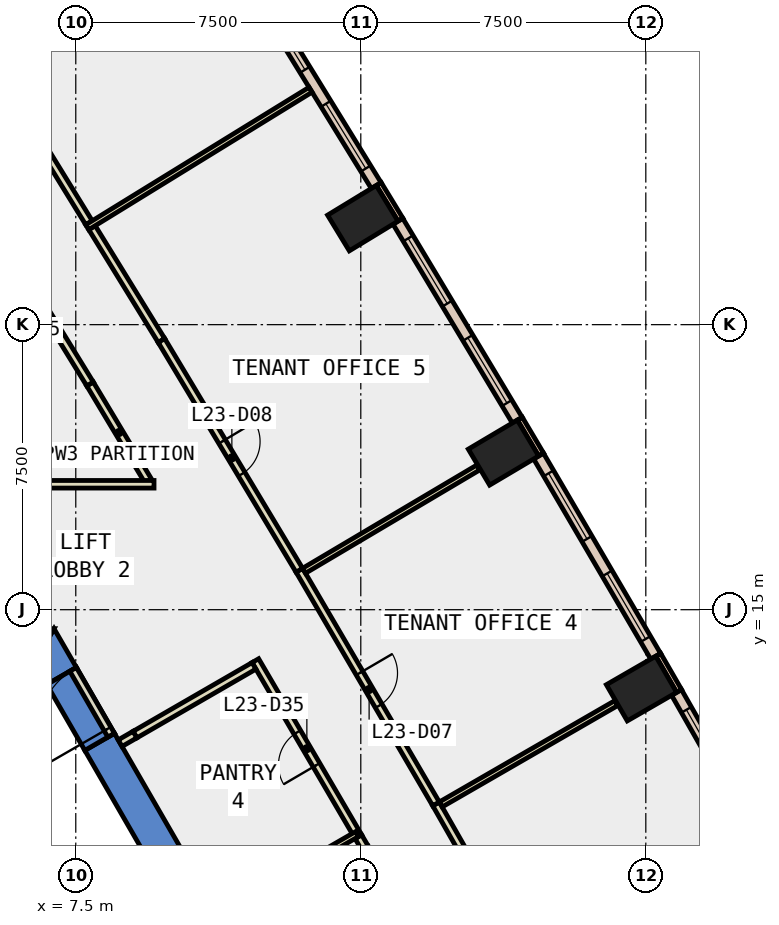
"""IFC4 building model, lengths in metres.
Left out: names, types, materials, properties, quantities, classifications, styles, units other than length and angle.
Written with IfcOpenShell. Run it as: python <this file> out.ifc"""

import sys

from ifc_helpers import new_model, si_unit, direction, frame, frame_2d, origin, origin_2d, place, context, subcontext, project, spatial, polyline, rectangle, outline, extrude, element, fill, save


model = new_model("IFC4")
c1 = context("Model", 3, precision=1e-05, world=origin(), true_north=direction((0.0, 1.0)))
c2 = subcontext(c1, "Body", "Model", "MODEL_VIEW")
j1 = project(units=[si_unit("LENGTHUNIT", "METRE"), si_unit("PLANEANGLEUNIT", "RADIAN")], contexts=[c1])
p1 = place(None, origin())
s1 = spatial("IfcSite", under=j1, at=p1, CompositionType="ELEMENT")
p2 = place(p1, origin())
s2 = spatial("IfcBuilding", under=s1, at=p2, CompositionType="ELEMENT")
p3 = place(p2, frame((0.0, 0.0, 107.6)))
s3 = spatial("IfcBuildingStorey", under=s2, at=p3, CompositionType="ELEMENT", Elevation=107.6)
for number, where, z_axis, x_axis in (
    (1, (22.387, 12.925, -0.4), (0.0, 0.0, 1.0), (-0.5, 0.866, 0.0)),
    (2, (18.755, 19.134, -0.4), (0.0, 0.0, 1.0), (-0.51, 0.86, 0.0)),
    (3, (15.053, 25.302, -0.4), (0.0, 0.0, 1.0), (-0.52, 0.854, 0.0)),
):
    element("IfcColumn", number, at=place(p3, frame(where, z_axis=z_axis, x_axis=x_axis)), inside=s3, PredefinedType="COLUMN", context=c2, shape_type="SweptSolid", body=[
        extrude(rectangle(XDim=1.1, YDim=1.5, at=origin_2d()), origin(), (0.0, 0.0, 1.0), 4.2),
    ])
p4 = place(p3, frame((0.0, 0.0, -0.4)))
e4 = element("IfcWall", 4, at=p4, inside=s3, PredefinedType="SHEAR", context=c2, shape_type="SweptSolid", body=[
    extrude(outline(polyline([(8.517, 11.748), (7.738, 11.298), (12.817, 2.5), (13.856, 2.5), (8.517, 11.748)])), origin(), (0.0, 0.0, 1.0), 4.2),
])
p5 = place(p3, frame((0.0, 0.0, -0.4)))
e5 = element("IfcWall", 5, at=p5, inside=s3, PredefinedType="SHEAR", context=c2, shape_type="SweptSolid", body=[
    extrude(outline(polyline([(6.738, 13.03), (7.517, 13.48), (6.928, 14.5), (6.409, 13.6), (6.738, 13.03)])), origin(), (0.0, 0.0, 1.0), 4.2),
])
p6 = place(p3, frame((0.0, 0.0, 3.6)))
e6 = element("IfcWall", 6, at=p6, inside=s3, PredefinedType="SHEAR", context=c2, shape_type="SweptSolid", body=[
    extrude(outline(polyline([(7.517, 13.48), (6.738, 13.03), (7.738, 11.298), (8.517, 11.748), (7.517, 13.48)])), origin(), (0.0, 0.0, 1.0), 0.2),
])
p7 = place(p3, frame((0.0, 0.0, -0.4)))
e7 = element("IfcWall", 7, at=p7, inside=s3, PredefinedType="SHEAR", context=c2, shape_type="SweptSolid", body=[
    extrude(outline(polyline([(4.55, 14.5), (4.55, 13.6), (6.409, 13.6), (6.928, 14.5), (4.55, 14.5)])), origin(), (0.0, 0.0, 1.0), 4.2),
])
p8 = place(p3, frame((23.376, 12.861, 0.0), z_axis=(0.0, 0.0, 1.0), x_axis=(-0.499933745558, 0.866063652425, 0.0)))
e8 = element("IfcWall", 8, at=p8, inside=s3, PredefinedType="STANDARD", context=c2, shape_type="SweptSolid", body=[
    extrude(rectangle(XDim=1.1, YDim=0.15, at=frame_2d((0.55, 0.0))), origin(), (0.0, 0.0, 1.0), 3.8),
])
p9 = place(p3, frame((19.745, 19.082, 0.0), z_axis=(0.0, 0.0, 1.0), x_axis=(-0.510082245696, 0.860125631885, 0.0)))
e9 = element("IfcWall", 9, at=p9, inside=s3, PredefinedType="STANDARD", context=c2, shape_type="SweptSolid", body=[
    extrude(rectangle(XDim=1.1, YDim=0.15, at=frame_2d((0.55, 0.0))), origin(), (0.0, 0.0, 1.0), 3.8),
])
p10 = place(p3, frame((16.044, 25.261, 0.0), z_axis=(0.0, 0.0, 1.0), x_axis=(-0.519869515594, 0.854245682901, 0.0)))
e10 = element("IfcWall", 10, at=p10, inside=s3, PredefinedType="STANDARD", context=c2, shape_type="SweptSolid", body=[
    extrude(rectangle(XDim=1.1, YDim=0.15, at=frame_2d((0.55, 0.0))), origin(), (0.0, 0.0, 1.0), 3.8),
])
p11 = place(p3, frame((26.33, 7.52, 0.0), z_axis=(0.0, 0.0, 1.0), x_axis=(-0.495113375427, 0.868828375154, 0.0)))
e11 = element("IfcWall", 11, at=p11, inside=s3, PredefinedType="STANDARD", context=c2, shape_type="SweptSolid", body=[
    extrude(rectangle(XDim=6.104, YDim=0.3, at=frame_2d((3.052, 0.0))), origin(), (0.0, 0.0, 1.0), 3.8),
])
p12 = place(p11, frame((0.526, 0.0, 0.9)))
e12 = element("IfcOpeningElement", 12, at=p12, cuts=e11, PredefinedType="OPENING", context=c2, shape_type="SweptSolid", body=[
    extrude(rectangle(XDim=2.0, YDim=2.6, at=frame_2d((1.0, 1.3))), frame((0.0, 0.16, 0.0), z_axis=(0.0, -1.0, 0.0), x_axis=(1.0, 0.0, 0.0)), (0.0, 0.0, 1.0), 0.32),
])
p13 = place(p11, frame((3.578, 0.0, 0.9)))
e13 = element("IfcOpeningElement", 13, at=p13, cuts=e11, PredefinedType="OPENING", context=c2, shape_type="SweptSolid", body=[
    extrude(rectangle(XDim=2.0, YDim=2.6, at=frame_2d((1.0, 1.3))), frame((0.0, 0.16, 0.0), z_axis=(0.0, -1.0, 0.0), x_axis=(1.0, 0.0, 0.0)), (0.0, 0.0, 1.0), 0.32),
])
p14 = place(p3, frame((22.759, 13.774, 0.0), z_axis=(0.0, 0.0, 1.0), x_axis=(-0.50490018297, 0.863177736759, 0.0)))
e14 = element("IfcWall", 14, at=p14, inside=s3, PredefinedType="STANDARD", context=c2, shape_type="SweptSolid", body=[
    extrude(rectangle(XDim=6.104, YDim=0.3, at=frame_2d((3.052, 0.0))), origin(), (0.0, 0.0, 1.0), 3.8),
])
p15 = place(p14, frame((0.526, 0.0, 0.9)))
e15 = element("IfcOpeningElement", 15, at=p15, cuts=e14, PredefinedType="OPENING", context=c2, shape_type="SweptSolid", body=[
    extrude(rectangle(XDim=2.0, YDim=2.6, at=frame_2d((1.0, 1.3))), frame((0.0, 0.16, 0.0), z_axis=(0.0, -1.0, 0.0), x_axis=(1.0, 0.0, 0.0)), (0.0, 0.0, 1.0), 0.32),
])
p16 = place(p14, frame((3.578, 0.0, 0.9)))
e16 = element("IfcOpeningElement", 16, at=p16, cuts=e14, PredefinedType="OPENING", context=c2, shape_type="SweptSolid", body=[
    extrude(rectangle(XDim=2.0, YDim=2.6, at=frame_2d((1.0, 1.3))), frame((0.0, 0.16, 0.0), z_axis=(0.0, -1.0, 0.0), x_axis=(1.0, 0.0, 0.0)), (0.0, 0.0, 1.0), 0.32),
])
p17 = place(p3, frame((19.117, 19.987, 0.0), z_axis=(0.0, 0.0, 1.0), x_axis=(-0.514560454873, 0.857454102726, 0.0)))
e17 = element("IfcWall", 17, at=p17, inside=s3, PredefinedType="STANDARD", context=c2, shape_type="SweptSolid", body=[
    extrude(rectangle(XDim=6.104, YDim=0.3, at=frame_2d((3.052, 0.0))), origin(), (0.0, 0.0, 1.0), 3.8),
])
p18 = place(p17, frame((0.526, 0.0, 0.9)))
e18 = element("IfcOpeningElement", 18, at=p18, cuts=e17, PredefinedType="OPENING", context=c2, shape_type="SweptSolid", body=[
    extrude(rectangle(XDim=2.0, YDim=2.6, at=frame_2d((1.0, 1.3))), frame((0.0, 0.16, 0.0), z_axis=(0.0, -1.0, 0.0), x_axis=(1.0, 0.0, 0.0)), (0.0, 0.0, 1.0), 0.32),
])
p19 = place(p17, frame((3.578, 0.0, 0.9)))
e19 = element("IfcOpeningElement", 19, at=p19, cuts=e17, PredefinedType="OPENING", context=c2, shape_type="SweptSolid", body=[
    extrude(rectangle(XDim=2.0, YDim=2.6, at=frame_2d((1.0, 1.3))), frame((0.0, 0.16, 0.0), z_axis=(0.0, -1.0, 0.0), x_axis=(1.0, 0.0, 0.0)), (0.0, 0.0, 1.0), 0.32),
])
p20 = place(p3, frame((15.406, 26.16, 0.0), z_axis=(0.0, 0.0, 1.0), x_axis=(-0.524121974895, 0.851643208998, 0.0)))
e20 = element("IfcWall", 20, at=p20, inside=s3, PredefinedType="STANDARD", context=c2, shape_type="SweptSolid", body=[
    extrude(rectangle(XDim=6.104, YDim=0.3, at=frame_2d((3.052, 0.0))), origin(), (0.0, 0.0, 1.0), 3.8),
])
p21 = place(p20, frame((0.526, 0.0, 0.9)))
e21 = element("IfcOpeningElement", 21, at=p21, cuts=e20, PredefinedType="OPENING", context=c2, shape_type="SweptSolid", body=[
    extrude(rectangle(XDim=2.0, YDim=2.6, at=frame_2d((1.0, 1.3))), frame((0.0, 0.16, 0.0), z_axis=(0.0, -1.0, 0.0), x_axis=(1.0, 0.0, 0.0)), (0.0, 0.0, 1.0), 0.32),
])
p22 = place(p20, frame((3.578, 0.0, 0.9)))
e22 = element("IfcOpeningElement", 22, at=p22, cuts=e20, PredefinedType="OPENING", context=c2, shape_type="SweptSolid", body=[
    extrude(rectangle(XDim=2.0, YDim=2.6, at=frame_2d((1.0, 1.3))), frame((0.0, 0.16, 0.0), z_axis=(0.0, -1.0, 0.0), x_axis=(1.0, 0.0, 0.0)), (0.0, 0.0, 1.0), 0.32),
])
p23 = place(p3, frame((15.112, 8.725, 0.0), z_axis=(0.0, 0.0, 1.0), x_axis=(-0.50443330283, 0.86345066043, 0.0)))
e23 = element("IfcWall", 23, at=p23, inside=s3, PredefinedType="PARTITIONING", context=c2, shape_type="SweptSolid", body=[
    extrude(rectangle(XDim=0.351, YDim=0.2, at=frame_2d((0.175, 0.0))), origin(), (0.0, 0.0, 1.0), 3.8),
])
p24 = place(p3, frame((14.935, 9.028, 0.0), z_axis=(0.0, 0.0, 1.0), x_axis=(-0.504934493304, 0.863157666636, 0.0)))
e24 = element("IfcWall", 24, at=p24, inside=s3, PredefinedType="PARTITIONING", context=c2, shape_type="SweptSolid", body=[
    extrude(rectangle(XDim=5.365, YDim=0.2, at=frame_2d((2.683, 0.0))), origin(), (0.0, 0.0, 1.0), 3.8),
])
p25 = place(p24, frame((2.182, 0.0, 0.0)))
e25 = element("IfcOpeningElement", 25, at=p25, cuts=e24, PredefinedType="OPENING", context=c2, shape_type="SweptSolid", body=[
    extrude(rectangle(XDim=1.0, YDim=2.1, at=frame_2d((0.5, 1.05))), frame((0.0, 0.11, 0.0), z_axis=(0.0, -1.0, 0.0), x_axis=(1.0, 0.0, 0.0)), (0.0, 0.0, 1.0), 0.22),
])
p26 = place(p3, frame((12.19, 13.522, 0.0), z_axis=(0.0, 0.0, 1.0), x_axis=(-0.866000156139, -0.500043727655, 0.0)))
e26 = element("IfcWall", 26, at=p26, inside=s3, PredefinedType="PARTITIONING", context=c2, shape_type="SweptSolid", body=[
    extrude(rectangle(XDim=3.618, YDim=0.2, at=frame_2d((1.809, 0.0))), origin(), (0.0, 0.0, 1.0), 3.8),
])
p27 = place(p3, frame((9.407, 18.386, 0.0), z_axis=(0.0, 0.0, 1.0), x_axis=(-0.514399309837, 0.857550785691, 0.0)))
e27 = element("IfcWall", 27, at=p27, inside=s3, PredefinedType="PARTITIONING", context=c2, shape_type="SweptSolid", body=[
    extrude(rectangle(XDim=2.978, YDim=0.2, at=frame_2d((1.489, 0.0))), origin(), (0.0, 0.0, 1.0), 3.8),
])
p28 = place(p3, frame((7.875, 20.94, 0.0), z_axis=(0.0, 0.0, 1.0), x_axis=(-0.524183774504, 0.851605172921, 0.0)))
e28 = element("IfcWall", 28, at=p28, inside=s3, PredefinedType="PARTITIONING", context=c2, shape_type="SweptSolid", body=[
    extrude(rectangle(XDim=7.099, YDim=0.2, at=frame_2d((3.549, 0.0))), origin(), (0.0, 0.0, 1.0), 3.8),
])
p29 = place(p28, frame((2.649, 0.0, 0.0)))
e29 = element("IfcOpeningElement", 29, at=p29, cuts=e28, PredefinedType="OPENING", context=c2, shape_type="SweptSolid", body=[
    extrude(rectangle(XDim=1.8, YDim=2.1, at=frame_2d((0.9, 1.05))), frame((0.0, 0.11, 0.0), z_axis=(0.0, -1.0, 0.0), x_axis=(1.0, 0.0, 0.0)), (0.0, 0.0, 1.0), 0.22),
])
p30 = place(p3, frame((16.98, 9.89, 0.0), z_axis=(0.0, 0.0, 1.0), x_axis=(0.495123170501, -0.868822793228, 0.0)))
e30 = element("IfcWall", 30, at=p30, inside=s3, PredefinedType="PARTITIONING", context=c2, shape_type="SweptSolid", body=[
    extrude(rectangle(XDim=7.198, YDim=0.2, at=frame_2d((3.599, 0.0))), origin(), (0.0, 0.0, 1.0), 3.8),
])
p31 = place(p30, frame((3.099, 0.0, 0.0)))
e31 = element("IfcOpeningElement", 31, at=p31, cuts=e30, PredefinedType="OPENING", context=c2, shape_type="SweptSolid", body=[
    extrude(rectangle(XDim=1.0, YDim=2.1, at=frame_2d((0.5, 1.05))), frame((0.0, 0.11, 0.0), z_axis=(0.0, -1.0, 0.0), x_axis=(1.0, 0.0, 0.0)), (0.0, 0.0, 1.0), 0.22),
])
p32 = place(p3, frame((13.383, 16.039, 0.0), z_axis=(0.0, 0.0, 1.0), x_axis=(0.504806221623, -0.863232690884, 0.0)))
e32 = element("IfcWall", 32, at=p32, inside=s3, PredefinedType="PARTITIONING", context=c2, shape_type="SweptSolid", body=[
    extrude(rectangle(XDim=7.124, YDim=0.2, at=frame_2d((3.562, 0.0))), origin(), (0.0, 0.0, 1.0), 3.8),
])
p33 = place(p32, frame((3.137, 0.0, 0.0)))
e33 = element("IfcOpeningElement", 33, at=p33, cuts=e32, PredefinedType="OPENING", context=c2, shape_type="SweptSolid", body=[
    extrude(rectangle(XDim=1.0, YDim=2.1, at=frame_2d((0.5, 1.05))), frame((0.0, 0.11, 0.0), z_axis=(0.0, -1.0, 0.0), x_axis=(1.0, 0.0, 0.0)), (0.0, 0.0, 1.0), 0.22),
])
p34 = place(p3, frame((7.927, 25.052, 0.0), z_axis=(0.0, 0.0, 1.0), x_axis=(0.524140390501, -0.851631875311, 0.0)))
e34 = element("IfcWall", 34, at=p34, inside=s3, PredefinedType="PARTITIONING", context=c2, shape_type="SweptSolid", body=[
    extrude(rectangle(XDim=3.487, YDim=0.2, at=frame_2d((1.744, 0.0))), origin(), (0.0, 0.0, 1.0), 3.8),
])
p35 = place(p3, frame((9.755, 22.082, 0.0), z_axis=(0.0, 0.0, 1.0), x_axis=(0.514582342012, -0.857440967816, 0.0)))
e35 = element("IfcWall", 35, at=p35, inside=s3, PredefinedType="PARTITIONING", context=c2, shape_type="SweptSolid", body=[
    extrude(rectangle(XDim=7.049, YDim=0.2, at=frame_2d((3.524, 0.0))), origin(), (0.0, 0.0, 1.0), 3.8),
])
p36 = place(p35, frame((3.1, 0.0, 0.0)))
e36 = element("IfcOpeningElement", 36, at=p36, cuts=e35, PredefinedType="OPENING", context=c2, shape_type="SweptSolid", body=[
    extrude(rectangle(XDim=1.0, YDim=2.1, at=frame_2d((0.5, 1.05))), frame((0.0, 0.11, 0.0), z_axis=(0.0, -1.0, 0.0), x_axis=(1.0, 0.0, 0.0)), (0.0, 0.0, 1.0), 0.22),
])
p37 = place(p3, frame((6.021, 28.149, 0.0), z_axis=(0.0, 0.0, 1.0), x_axis=(0.524062258075, -0.851679957297, 0.0)))
e37 = element("IfcWall", 37, at=p37, inside=s3, PredefinedType="PARTITIONING", context=c2, shape_type="SweptSolid", body=[
    extrude(rectangle(XDim=3.486, YDim=0.2, at=frame_2d((1.743, 0.0))), origin(), (0.0, 0.0, 1.0), 3.8),
])
p38 = place(p3, frame((11.261, 6.994, 0.0), z_axis=(0.0, 0.0, 1.0), x_axis=(0.866037428454, 0.499979172084, 0.0)))
e38 = element("IfcWall", 38, at=p38, inside=s3, PredefinedType="PARTITIONING", context=c2, shape_type="SweptSolid", body=[
    extrude(rectangle(XDim=4.198, YDim=0.15, at=frame_2d((2.099, 0.0))), origin(), (0.0, 0.0, 1.0), 3.8),
])
p39 = place(p3, frame((17.104, 9.875, 0.0), z_axis=(0.0, 0.0, 1.0), x_axis=(0.866024640963, 0.500001321243, 0.0)))
e39 = element("IfcWall", 39, at=p39, inside=s3, PredefinedType="PARTITIONING", context=c2, shape_type="SweptSolid", body=[
    extrude(rectangle(XDim=5.33, YDim=0.15, at=frame_2d((2.665, 0.0))), origin(), (0.0, 0.0, 1.0), 3.8),
])
p40 = place(p3, frame((13.507, 16.025, 0.0), z_axis=(0.0, 0.0, 1.0), x_axis=(0.860289301319, 0.509806157315, 0.0)))
e40 = element("IfcWall", 40, at=p40, inside=s3, PredefinedType="PARTITIONING", context=c2, shape_type="SweptSolid", body=[
    extrude(rectangle(XDim=5.33, YDim=0.15, at=frame_2d((2.665, 0.0))), origin(), (0.0, 0.0, 1.0), 3.8),
])
p41 = place(p3, frame((7.802, 25.064, 0.0), z_axis=(0.0, 0.0, 1.0), x_axis=(0.851596352662, 0.524198103901, 0.0)))
e41 = element("IfcWall", 41, at=p41, inside=s3, PredefinedType="PARTITIONING", context=c2, shape_type="SweptSolid", body=[
    extrude(rectangle(XDim=6.9, YDim=0.15, at=frame_2d((3.45, 0.0))), origin(), (0.0, 0.0, 1.0), 3.8),
])
p42 = place(p3, frame((8.43, 11.698, 0.0), z_axis=(0.0, 0.0, 1.0), x_axis=(-0.50002537861, 0.866010750942, 0.0)))
e42 = element("IfcWall", 42, at=p42, inside=s3, PredefinedType="PARTITIONING", context=c2, shape_type="SweptSolid", body=[
    extrude(rectangle(XDim=2.0, YDim=0.2, at=frame_2d((1.0, 0.0))), origin(), (0.0, 0.0, 1.0), 2.4),
])
p43 = place(p42, frame((0.19, 0.0, 0.0)))
e43 = element("IfcOpeningElement", 43, at=p43, cuts=e42, PredefinedType="OPENING", context=c2, shape_type="SweptSolid", body=[
    extrude(rectangle(XDim=1.8, YDim=2.1, at=frame_2d((0.9, 1.05))), frame((0.0, 0.11, 0.0), z_axis=(0.0, -1.0, 0.0), x_axis=(1.0, 0.0, 0.0)), (0.0, 0.0, 1.0), 0.22),
])
p44 = place(p3, frame((0.4, 18.3, 0.0), z_axis=(0.0, 0.0, 1.0), x_axis=(1.0, 0.0, 0.0)))
e44 = element("IfcWall", 44, at=p44, inside=s3, PredefinedType="PARTITIONING", context=c2, shape_type="SweptSolid", body=[
    extrude(rectangle(XDim=9.159, YDim=0.2, at=frame_2d((4.58, 0.0))), origin(), (0.0, 0.0, 1.0), 3.8),
])
p45 = place(p3, frame((9.057, 11.713, 0.0), z_axis=(0.0, 0.0, 1.0), x_axis=(-0.866266849364, -0.49958157061, 0.0)))
e45 = element("IfcWall", 45, at=p45, inside=s3, PredefinedType="PARTITIONING", context=c2, shape_type="SweptSolid", body=[
    extrude(rectangle(XDim=0.45, YDim=0.2, at=frame_2d((0.225, 0.0))), origin(), (0.0, 0.0, 1.0), 2.4),
])
p46 = place(p3, frame((8.48, 3.412, 0.0), z_axis=(0.0, 0.0, 1.0), x_axis=(-0.499978703459, 0.866037698999, 0.0)))
e46 = element("IfcWall", 46, at=p46, inside=s3, PredefinedType="STANDARD", context=c2, shape_type="SweptSolid", body=[
    extrude(rectangle(XDim=6.9, YDim=0.2, at=frame_2d((3.45, 0.0))), origin(), (0.0, 0.0, 1.0), 3.8),
])
p47 = place(p13, origin())
e47 = element("IfcWindow", 47, at=p47, inside=s3, PartitioningType="SINGLE_PANEL", PredefinedType="WINDOW", context=c2, shape_type="SweptSolid", body=[
    extrude(rectangle(XDim=2.0, YDim=2.6, at=frame_2d((1.0, 1.3))), frame((0.0, 0.03, 0.0), z_axis=(0.0, -1.0, 0.0), x_axis=(1.0, 0.0, 0.0)), (0.0, 0.0, 1.0), 0.06),
])
fill(e13, e47)
p48 = place(p15, origin())
e48 = element("IfcWindow", 48, at=p48, inside=s3, PartitioningType="SINGLE_PANEL", PredefinedType="WINDOW", context=c2, shape_type="SweptSolid", body=[
    extrude(rectangle(XDim=2.0, YDim=2.6, at=frame_2d((1.0, 1.3))), frame((0.0, 0.03, 0.0), z_axis=(0.0, -1.0, 0.0), x_axis=(1.0, 0.0, 0.0)), (0.0, 0.0, 1.0), 0.06),
])
fill(e15, e48)
p49 = place(p16, origin())
e49 = element("IfcWindow", 49, at=p49, inside=s3, PartitioningType="SINGLE_PANEL", PredefinedType="WINDOW", context=c2, shape_type="SweptSolid", body=[
    extrude(rectangle(XDim=2.0, YDim=2.6, at=frame_2d((1.0, 1.3))), frame((0.0, 0.03, 0.0), z_axis=(0.0, -1.0, 0.0), x_axis=(1.0, 0.0, 0.0)), (0.0, 0.0, 1.0), 0.06),
])
fill(e16, e49)
p50 = place(p18, origin())
e50 = element("IfcWindow", 50, at=p50, inside=s3, PartitioningType="SINGLE_PANEL", PredefinedType="WINDOW", context=c2, shape_type="SweptSolid", body=[
    extrude(rectangle(XDim=2.0, YDim=2.6, at=frame_2d((1.0, 1.3))), frame((0.0, 0.03, 0.0), z_axis=(0.0, -1.0, 0.0), x_axis=(1.0, 0.0, 0.0)), (0.0, 0.0, 1.0), 0.06),
])
fill(e18, e50)
p51 = place(p19, origin())
e51 = element("IfcWindow", 51, at=p51, inside=s3, PartitioningType="SINGLE_PANEL", PredefinedType="WINDOW", context=c2, shape_type="SweptSolid", body=[
    extrude(rectangle(XDim=2.0, YDim=2.6, at=frame_2d((1.0, 1.3))), frame((0.0, 0.03, 0.0), z_axis=(0.0, -1.0, 0.0), x_axis=(1.0, 0.0, 0.0)), (0.0, 0.0, 1.0), 0.06),
])
fill(e19, e51)
p52 = place(p21, origin())
e52 = element("IfcWindow", 52, at=p52, inside=s3, PartitioningType="SINGLE_PANEL", PredefinedType="WINDOW", context=c2, shape_type="SweptSolid", body=[
    extrude(rectangle(XDim=2.0, YDim=2.6, at=frame_2d((1.0, 1.3))), frame((0.0, 0.03, 0.0), z_axis=(0.0, -1.0, 0.0), x_axis=(1.0, 0.0, 0.0)), (0.0, 0.0, 1.0), 0.06),
])
fill(e21, e52)
p53 = place(p22, origin())
e53 = element("IfcWindow", 53, at=p53, inside=s3, PartitioningType="SINGLE_PANEL", PredefinedType="WINDOW", context=c2, shape_type="SweptSolid", body=[
    extrude(rectangle(XDim=2.0, YDim=2.6, at=frame_2d((1.0, 1.3))), frame((0.0, 0.03, 0.0), z_axis=(0.0, -1.0, 0.0), x_axis=(1.0, 0.0, 0.0)), (0.0, 0.0, 1.0), 0.06),
])
fill(e22, e53)
p54 = place(p33, origin())
e54 = element("IfcDoor", 54, at=p54, inside=s3, OperationType="SINGLE_SWING_LEFT", PredefinedType="DOOR", context=c2, shape_type="SweptSolid", body=[
    extrude(rectangle(XDim=1.0, YDim=2.1, at=frame_2d((0.5, 1.05))), frame((0.0, 0.025, 0.0), z_axis=(0.0, -1.0, 0.0), x_axis=(1.0, 0.0, 0.0)), (0.0, 0.0, 1.0), 0.05),
])
fill(e33, e54)
p55 = place(p36, origin())
e55 = element("IfcDoor", 55, at=p55, inside=s3, OperationType="SINGLE_SWING_LEFT", PredefinedType="DOOR", context=c2, shape_type="SweptSolid", body=[
    extrude(rectangle(XDim=1.0, YDim=2.1, at=frame_2d((0.5, 1.05))), frame((0.0, 0.025, 0.0), z_axis=(0.0, -1.0, 0.0), x_axis=(1.0, 0.0, 0.0)), (0.0, 0.0, 1.0), 0.05),
])
fill(e36, e55)
p56 = place(p25, origin())
e56 = element("IfcDoor", 56, at=p56, inside=s3, OperationType="SINGLE_SWING_LEFT", PredefinedType="DOOR", context=c2, shape_type="SweptSolid", body=[
    extrude(rectangle(XDim=1.0, YDim=2.1, at=frame_2d((0.5, 1.05))), frame((0.0, 0.025, 0.0), z_axis=(0.0, -1.0, 0.0), x_axis=(1.0, 0.0, 0.0)), (0.0, 0.0, 1.0), 0.05),
])
fill(e25, e56)
p57 = place(p43, origin())
e57 = element("IfcDoor", 57, at=p57, inside=s3, OperationType="DOUBLE_DOOR_SINGLE_SWING", PredefinedType="DOOR", context=c2, shape_type="SweptSolid", body=[
    extrude(rectangle(XDim=1.8, YDim=2.1, at=frame_2d((0.9, 1.05))), frame((0.0, 0.025, 0.0), z_axis=(0.0, -1.0, 0.0), x_axis=(1.0, 0.0, 0.0)), (0.0, 0.0, 1.0), 0.05),
])
fill(e43, e57)
save(model, sys.argv[1])
